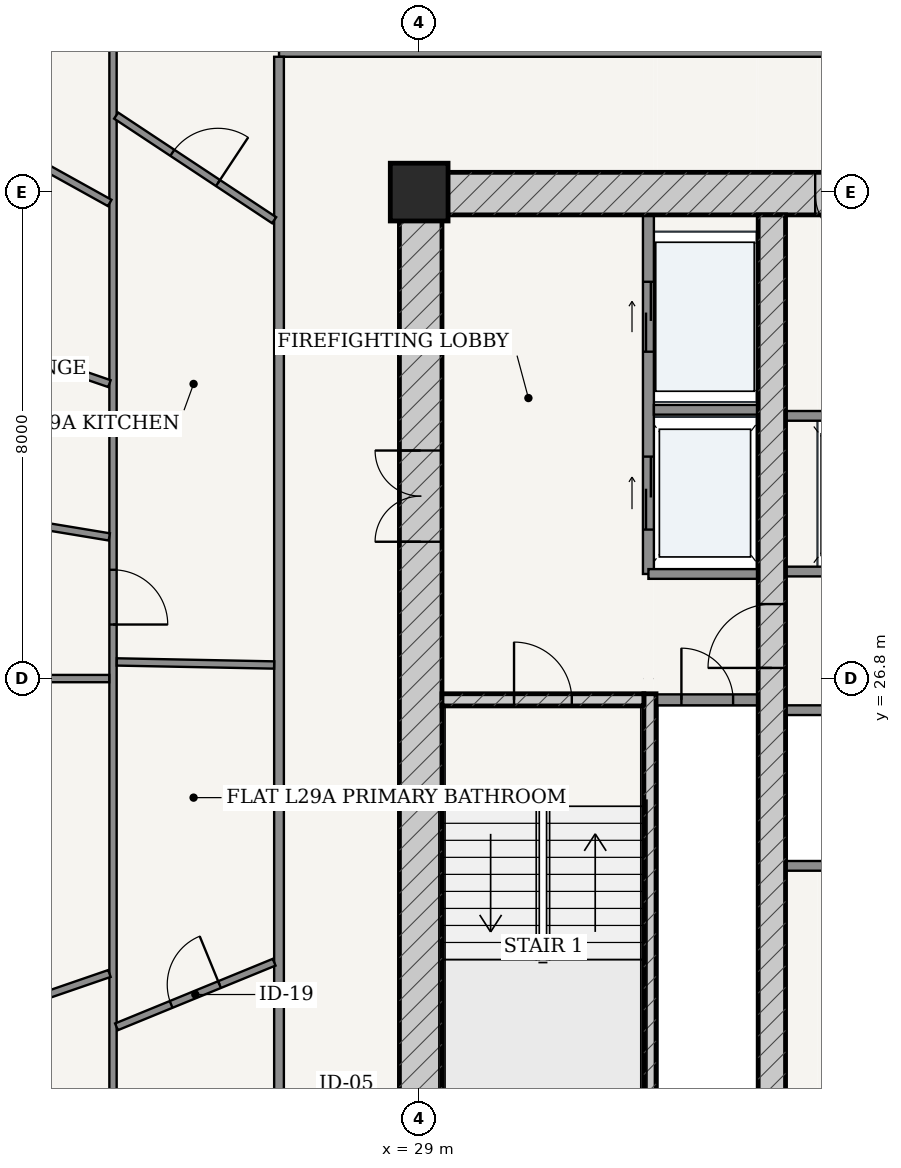
"""IFC4 building model, lengths in metres.
Left out: names, types, materials, properties, quantities, classifications, styles, units other than length and angle.
Written with IfcOpenShell. Run it as: python <this file> out.ifc"""

import sys

from ifc_helpers import new_model, si_unit, direction, frame, frame_2d, origin, origin_2d, place, context, subcontext, project, spatial, rectangle, extrude, source, transform, mapped, element, fill, save


model = new_model("IFC4")
c1 = context("Model", 3, precision=1e-05, world=origin(), true_north=direction((-0.2419218956, 0.970295726276)))
c2 = subcontext(c1, "Body", "Model", "MODEL_VIEW")
j1 = project(units=[si_unit("LENGTHUNIT", "METRE"), si_unit("PLANEANGLEUNIT", "RADIAN")], contexts=[c1])
p1 = place(None, origin())
s1 = spatial("IfcSite", under=j1, at=p1, CompositionType="ELEMENT")
p2 = place(p1, origin())
s2 = spatial("IfcBuilding", under=s1, at=p2, CompositionType="ELEMENT")
p3 = place(p2, frame((0.0, 0.0, 112.2)))
s3 = spatial("IfcBuildingStorey", under=s2, at=p3, CompositionType="ELEMENT", Elevation=112.2)
p4 = place(p3, frame((29.0, 34.8, 0.0), z_axis=(0.0, 0.0, 1.0), x_axis=(1.0, 0.0, 0.0)))
e1 = element("IfcColumn", 1, at=p4, inside=s3, PredefinedType="COLUMN", context=c2, shape_type="SweptSolid", body=[
    extrude(rectangle(XDim=0.95, YDim=0.95, at=origin_2d()), origin(), (0.0, 0.0, 1.0), 3.6),
])
p5 = place(p3, frame((28.675, 34.775, 0.0), z_axis=(0.0, 0.0, 1.0), x_axis=(1.0, 0.0, 0.0)))
e2 = element("IfcWall", 2, at=p5, inside=s3, PredefinedType="SHEAR", context=c2, shape_type="SweptSolid", body=[
    extrude(rectangle(XDim=18.65, YDim=0.7, at=frame_2d((9.325, 0.0))), origin(), (0.0, 0.0, 1.0), 3.325),
])
p6 = place(p5, frame((6.837, 0.0, 0.0)))
e3 = element("IfcOpeningElement", 3, at=p6, cuts=e2, PredefinedType="OPENING", context=c2, shape_type="SweptSolid", body=[
    extrude(rectangle(XDim=0.85, YDim=2.1, at=frame_2d((0.425, 1.05))), frame((0.0, 0.36, 0.0), z_axis=(0.0, -1.0, 0.0), x_axis=(1.0, 0.0, 0.0)), (0.0, 0.0, 1.0), 0.72),
])
p7 = place(p5, frame((8.895, 0.0, 0.0)))
e4 = element("IfcOpeningElement", 4, at=p7, cuts=e2, PredefinedType="OPENING", context=c2, shape_type="SweptSolid", body=[
    extrude(rectangle(XDim=0.86, YDim=2.1, at=frame_2d((0.43, 1.05))), frame((0.0, 0.36, 0.0), z_axis=(0.0, -1.0, 0.0), x_axis=(1.0, 0.0, 0.0)), (0.0, 0.0, 1.0), 0.72),
])
p8 = place(p5, frame((10.962, 0.0, 0.0)))
e5 = element("IfcOpeningElement", 5, at=p8, cuts=e2, PredefinedType="OPENING", context=c2, shape_type="SweptSolid", body=[
    extrude(rectangle(XDim=0.85, YDim=2.1, at=frame_2d((0.425, 1.05))), frame((0.0, 0.36, 0.0), z_axis=(0.0, -1.0, 0.0), x_axis=(1.0, 0.0, 0.0)), (0.0, 0.0, 1.0), 0.72),
])
p9 = place(p3, frame((29.025, 19.175, 0.0), z_axis=(0.0, 0.0, 1.0), x_axis=(0.0, 1.0, 0.0)))
e6 = element("IfcWall", 6, at=p9, inside=s3, PredefinedType="SHEAR", context=c2, shape_type="SweptSolid", body=[
    extrude(rectangle(XDim=15.25, YDim=0.7, at=frame_2d((7.625, 0.0))), origin(), (0.0, 0.0, 1.0), 3.325),
])
p10 = place(p9, frame((9.875, 0.0, 0.0)))
e7 = element("IfcOpeningElement", 7, at=p10, cuts=e6, PredefinedType="OPENING", context=c2, shape_type="SweptSolid", body=[
    extrude(rectangle(XDim=1.5, YDim=2.2, at=frame_2d((0.75, 1.1))), frame((0.0, 0.36, 0.0), z_axis=(0.0, -1.0, 0.0), x_axis=(1.0, 0.0, 0.0)), (0.0, 0.0, 1.0), 0.72),
])
p11 = place(p3, frame((32.795, 19.175, 0.0), z_axis=(0.0, 0.0, 1.0), x_axis=(0.0, 1.0, 0.0)))
e8 = element("IfcWall", 8, at=p11, inside=s3, PredefinedType="SOLIDWALL", context=c2, shape_type="SweptSolid", body=[
    extrude(rectangle(XDim=7.375, YDim=0.2, at=frame_2d((3.688, 0.0))), origin(), (0.0, 0.0, 1.0), 3.325),
])
p12 = place(p3, frame((29.375, 26.45, 0.0), z_axis=(0.0, 0.0, 1.0), x_axis=(1.0, 0.0, 0.0)))
e9 = element("IfcWall", 9, at=p12, inside=s3, PredefinedType="SOLIDWALL", context=c2, shape_type="SweptSolid", body=[
    extrude(rectangle(XDim=3.32, YDim=0.2, at=frame_2d((1.66, 0.0))), origin(), (0.0, 0.0, 1.0), 3.325),
])
p13 = place(p12, frame((1.185, 0.0, 0.0)))
e10 = element("IfcOpeningElement", 10, at=p13, cuts=e9, PredefinedType="OPENING", context=c2, shape_type="SweptSolid", body=[
    extrude(rectangle(XDim=0.95, YDim=2.15, at=frame_2d((0.475, 1.075))), frame((0.0, 0.11, 0.0), z_axis=(0.0, -1.0, 0.0), x_axis=(1.0, 0.0, 0.0)), (0.0, 0.0, 1.0), 0.22),
])
p14 = place(p3, frame((34.8, 19.175, 0.0), z_axis=(0.0, 0.0, 1.0), x_axis=(0.0, 1.0, 0.0)))
e11 = element("IfcWall", 11, at=p14, inside=s3, PredefinedType="SHEAR", context=c2, shape_type="SweptSolid", body=[
    extrude(rectangle(XDim=15.25, YDim=0.45, at=frame_2d((7.625, 0.0))), origin(), (0.0, 0.0, 1.0), 3.325),
])
p15 = place(p14, frame((7.8, 0.0, 0.0)))
e12 = element("IfcOpeningElement", 12, at=p15, cuts=e11, PredefinedType="OPENING", context=c2, shape_type="SweptSolid", body=[
    extrude(rectangle(XDim=1.05, YDim=2.15, at=frame_2d((0.525, 1.075))), frame((0.0, 0.235, 0.0), z_axis=(0.0, -1.0, 0.0), x_axis=(1.0, 0.0, 0.0)), (0.0, 0.0, 1.0), 0.47),
])
p16 = place(p3, frame((32.9, 26.45, 0.0), z_axis=(0.0, 0.0, 1.0), x_axis=(1.0, 0.0, 0.0)))
e13 = element("IfcWall", 13, at=p16, inside=s3, PredefinedType="PARTITIONING", context=c2, shape_type="SweptSolid", body=[
    extrude(rectangle(XDim=1.675, YDim=0.18, at=frame_2d((0.837, 0.0))), origin(), (0.0, 0.0, 1.0), 3.325),
])
p17 = place(p16, frame((0.413, 0.0, 0.0)))
e14 = element("IfcOpeningElement", 14, at=p17, cuts=e13, PredefinedType="OPENING", context=c2, shape_type="SweptSolid", body=[
    extrude(rectangle(XDim=0.85, YDim=2.1, at=frame_2d((0.425, 1.05))), frame((0.0, 0.1, 0.0), z_axis=(0.0, -1.0, 0.0), x_axis=(1.0, 0.0, 0.0)), (0.0, 0.0, 1.0), 0.2),
])
p18 = place(p3, frame((32.77, 28.52, 0.0), z_axis=(0.0, 0.0, 1.0), x_axis=(0.0, 1.0, 0.0)))
e15 = element("IfcWall", 15, at=p18, inside=s3, PredefinedType="PARTITIONING", context=c2, shape_type="SweptSolid", body=[
    extrude(rectangle(XDim=5.905, YDim=0.18, at=frame_2d((2.953, 0.0))), origin(), (0.0, 0.0, 1.0), 3.325),
])
p19 = place(p18, frame((3.655, 0.0, 0.0)))
e16 = element("IfcOpeningElement", 16, at=p19, cuts=e15, PredefinedType="OPENING", context=c2, shape_type="SweptSolid", body=[
    extrude(rectangle(XDim=1.15, YDim=2.2, at=frame_2d((0.575, 1.1))), frame((0.0, 0.1, 0.0), z_axis=(0.0, -1.0, 0.0), x_axis=(1.0, 0.0, 0.0)), (0.0, 0.0, 1.0), 0.2),
])
p20 = place(p18, frame((0.73, 0.0, 0.0)))
e17 = element("IfcOpeningElement", 17, at=p20, cuts=e15, PredefinedType="OPENING", context=c2, shape_type="SweptSolid", body=[
    extrude(rectangle(XDim=1.2, YDim=2.25, at=frame_2d((0.6, 1.125))), frame((0.0, 0.1, 0.0), z_axis=(0.0, -1.0, 0.0), x_axis=(1.0, 0.0, 0.0)), (0.0, 0.0, 1.0), 0.2),
])
p21 = place(p3, frame((32.86, 31.22, 0.0), z_axis=(0.0, 0.0, 1.0), x_axis=(1.0, 0.0, 0.0)))
e18 = element("IfcWall", 18, at=p21, inside=s3, PredefinedType="PARTITIONING", context=c2, shape_type="SweptSolid", body=[
    extrude(rectangle(XDim=1.715, YDim=0.16, at=frame_2d((0.857, 0.0))), origin(), (0.0, 0.0, 1.0), 3.325),
])
p22 = place(p3, frame((32.77, 28.52, 0.0), z_axis=(0.0, 0.0, 1.0), x_axis=(1.0, 0.0, 0.0)))
e19 = element("IfcWall", 19, at=p22, inside=s3, PredefinedType="PARTITIONING", context=c2, shape_type="SweptSolid", body=[
    extrude(rectangle(XDim=1.805, YDim=0.16, at=frame_2d((0.902, 0.0))), origin(), (0.0, 0.0, 1.0), 3.325),
])
p23 = place(p3, frame((35.025, 28.56, 0.0), z_axis=(0.0, 0.0, 1.0), x_axis=(1.0, 0.0, 0.0)))
e20 = element("IfcWall", 20, at=p23, inside=s3, PredefinedType="PARTITIONING", context=c2, shape_type="SweptSolid", body=[
    extrude(rectangle(XDim=5.95, YDim=0.16, at=frame_2d((2.975, 0.0))), origin(), (0.0, 0.0, 1.0), 3.325),
])
p24 = place(p23, frame((0.76, 0.0, 0.0)))
e21 = element("IfcOpeningElement", 21, at=p24, cuts=e20, PredefinedType="OPENING", context=c2, shape_type="SweptSolid", body=[
    extrude(rectangle(XDim=1.1, YDim=2.2, at=frame_2d((0.55, 1.1))), frame((0.0, 0.09, 0.0), z_axis=(0.0, -1.0, 0.0), x_axis=(1.0, 0.0, 0.0)), (0.0, 0.0, 1.0), 0.18),
])
p25 = place(p23, frame((2.425, 0.0, 0.0)))
e22 = element("IfcOpeningElement", 22, at=p25, cuts=e20, PredefinedType="OPENING", context=c2, shape_type="SweptSolid", body=[
    extrude(rectangle(XDim=1.1, YDim=2.2, at=frame_2d((0.55, 1.1))), frame((0.0, 0.09, 0.0), z_axis=(0.0, -1.0, 0.0), x_axis=(1.0, 0.0, 0.0)), (0.0, 0.0, 1.0), 0.18),
])
p26 = place(p23, frame((4.09, 0.0, 0.0)))
e23 = element("IfcOpeningElement", 23, at=p26, cuts=e20, PredefinedType="OPENING", context=c2, shape_type="SweptSolid", body=[
    extrude(rectangle(XDim=1.1, YDim=2.2, at=frame_2d((0.55, 1.1))), frame((0.0, 0.09, 0.0), z_axis=(0.0, -1.0, 0.0), x_axis=(1.0, 0.0, 0.0)), (0.0, 0.0, 1.0), 0.18),
])
for number, where, z_axis, x_axis in (
    (24, (35.025, 31.12, 0.0), (0.0, 0.0, 1.0), (1.0, 0.0, 0.0)),
    (25, (35.025, 26.28, 0.0), (0.0, 0.0, 1.0), (1.0, 0.0, 0.0)),
    (26, (35.025, 23.72, 0.0), (0.0, 0.0, 1.0), (1.0, 0.0, 0.0)),
):
    element("IfcWall", number, at=place(p3, frame(where, z_axis=z_axis, x_axis=x_axis)), inside=s3, PredefinedType="PARTITIONING", context=c2, shape_type="SweptSolid", body=[
        extrude(rectangle(XDim=5.95, YDim=0.16, at=frame_2d((2.975, 0.0))), origin(), (0.0, 0.0, 1.0), 3.325),
    ])
p27 = place(p3, frame((26.695, 37.105, 0.0), z_axis=(0.0, 0.0, 1.0), x_axis=(1.0, 0.0, 0.0)))
e27 = element("IfcWall", 27, at=p27, inside=s3, PredefinedType="PARTITIONING", context=c2, shape_type="SweptSolid", body=[
    extrude(rectangle(XDim=22.61, YDim=0.16, at=frame_2d((11.305, 0.0))), origin(), (0.0, 0.0, 1.0), 2.767),
])
p28 = place(p3, frame((26.695, 16.575, 0.0), z_axis=(0.0, 0.0, 1.0), x_axis=(0.0, 1.0, 0.0)))
e28 = element("IfcWall", 28, at=p28, inside=s3, PredefinedType="PARTITIONING", context=c2, shape_type="SweptSolid", body=[
    extrude(rectangle(XDim=20.45, YDim=0.16, at=frame_2d((10.225, 0.0))), origin(), (0.0, 0.0, 1.0), 2.767),
])
p29 = place(p28, frame((2.424, 0.0, 0.0)))
e29 = element("IfcOpeningElement", 29, at=p29, cuts=e28, PredefinedType="OPENING", context=c2, shape_type="SweptSolid", body=[
    extrude(rectangle(XDim=0.98, YDim=2.2, at=frame_2d((0.49, 1.1))), frame((0.0, 0.09, 0.0), z_axis=(0.0, -1.0, 0.0), x_axis=(1.0, 0.0, 0.0)), (0.0, 0.0, 1.0), 0.18),
])
p30 = place(p3, frame((23.965, 13.765, 0.0), z_axis=(0.0, 0.0, 1.0), x_axis=(0.0, 1.0, 0.0)))
e30 = element("IfcWall", 30, at=p30, inside=s3, PredefinedType="PARTITIONING", context=c2, shape_type="SweptSolid", body=[
    extrude(rectangle(XDim=26.07, YDim=0.12, at=frame_2d((13.035, 0.0))), origin(), (0.0, 0.0, 1.0), 2.767),
])
p31 = place(p30, frame((3.362, 0.0, 0.0)))
e31 = element("IfcOpeningElement", 31, at=p31, cuts=e30, PredefinedType="OPENING", context=c2, shape_type="SweptSolid", body=[
    extrude(rectangle(XDim=0.9, YDim=2.15, at=frame_2d((0.45, 1.075))), frame((0.0, 0.07, 0.0), z_axis=(0.0, -1.0, 0.0), x_axis=(1.0, 0.0, 0.0)), (0.0, 0.0, 1.0), 0.14),
])
p32 = place(p30, frame((13.924, 0.0, 0.0)))
e32 = element("IfcOpeningElement", 32, at=p32, cuts=e30, PredefinedType="OPENING", context=c2, shape_type="SweptSolid", body=[
    extrude(rectangle(XDim=0.9, YDim=2.15, at=frame_2d((0.45, 1.075))), frame((0.0, 0.07, 0.0), z_axis=(0.0, -1.0, 0.0), x_axis=(1.0, 0.0, 0.0)), (0.0, 0.0, 1.0), 0.14),
])
p33 = place(p3, frame((23.911, 34.622, 0.0), z_axis=(0.0, 0.0, 1.0), x_axis=(-0.874324904351, 0.485341077626, 0.0)))
e33 = element("IfcWall", 33, at=p33, inside=s3, PredefinedType="PARTITIONING", context=c2, shape_type="SweptSolid", body=[
    extrude(rectangle(XDim=9.066, YDim=0.12, at=frame_2d((4.533, 0.0))), origin(), (0.0, 0.0, 1.0), 2.767),
])
p34 = place(p3, frame((23.906, 31.65, 0.0), z_axis=(0.0, 0.0, 1.0), x_axis=(-0.945573120726, 0.32540970078, 0.0)))
e34 = element("IfcWall", 34, at=p34, inside=s3, PredefinedType="PARTITIONING", context=c2, shape_type="SweptSolid", body=[
    extrude(rectangle(XDim=11.022, YDim=0.12, at=frame_2d((5.511, 0.0))), origin(), (0.0, 0.0, 1.0), 2.767),
])
p35 = place(p34, frame((5.061, 0.0, 0.0)))
e35 = element("IfcOpeningElement", 35, at=p35, cuts=e34, PredefinedType="OPENING", context=c2, shape_type="SweptSolid", body=[
    extrude(rectangle(XDim=0.9, YDim=2.15, at=frame_2d((0.45, 1.075))), frame((0.0, 0.07, 0.0), z_axis=(0.0, -1.0, 0.0), x_axis=(1.0, 0.0, 0.0)), (0.0, 0.0, 1.0), 0.14),
])
p36 = place(p3, frame((23.904, 29.13, 0.0), z_axis=(0.0, 0.0, 1.0), x_axis=(-0.986618264768, 0.163047231274, 0.0)))
e36 = element("IfcWall", 36, at=p36, inside=s3, PredefinedType="PARTITIONING", context=c2, shape_type="SweptSolid", body=[
    extrude(rectangle(XDim=12.039, YDim=0.12, at=frame_2d((6.02, 0.0))), origin(), (0.0, 0.0, 1.0), 2.767),
])
p37 = place(p36, frame((4.496, 0.0, 0.0)))
e37 = element("IfcOpeningElement", 37, at=p37, cuts=e36, PredefinedType="OPENING", context=c2, shape_type="SweptSolid", body=[
    extrude(rectangle(XDim=0.9, YDim=2.15, at=frame_2d((0.45, 1.075))), frame((0.0, 0.07, 0.0), z_axis=(0.0, -1.0, 0.0), x_axis=(1.0, 0.0, 0.0)), (0.0, 0.0, 1.0), 0.14),
])
p38 = place(p3, frame((23.903, 26.8, 0.0), z_axis=(0.0, 0.0, 1.0), x_axis=(-1.0, 0.0, 0.0)))
e38 = element("IfcWall", 38, at=p38, inside=s3, PredefinedType="PARTITIONING", context=c2, shape_type="SweptSolid", body=[
    extrude(rectangle(XDim=12.443, YDim=0.12, at=frame_2d((6.222, 0.0))), origin(), (0.0, 0.0, 1.0), 2.767),
])
p39 = place(p38, frame((5.771, 0.0, 0.0)))
e39 = element("IfcOpeningElement", 39, at=p39, cuts=e38, PredefinedType="OPENING", context=c2, shape_type="SweptSolid", body=[
    extrude(rectangle(XDim=0.9, YDim=2.15, at=frame_2d((0.45, 1.075))), frame((0.0, 0.07, 0.0), z_axis=(0.0, -1.0, 0.0), x_axis=(1.0, 0.0, 0.0)), (0.0, 0.0, 1.0), 0.14),
])
p40 = place(p3, frame((23.906, 21.95, 0.0), z_axis=(0.0, 0.0, 1.0), x_axis=(-0.945573120726, -0.32540970078, 0.0)))
e40 = element("IfcWall", 40, at=p40, inside=s3, PredefinedType="PARTITIONING", context=c2, shape_type="SweptSolid", body=[
    extrude(rectangle(XDim=11.022, YDim=0.12, at=frame_2d((5.511, 0.0))), origin(), (0.0, 0.0, 1.0), 2.767),
])
p41 = place(p40, frame((5.061, 0.0, 0.0)))
e41 = element("IfcOpeningElement", 41, at=p41, cuts=e40, PredefinedType="OPENING", context=c2, shape_type="SweptSolid", body=[
    extrude(rectangle(XDim=0.9, YDim=2.15, at=frame_2d((0.45, 1.075))), frame((0.0, 0.07, 0.0), z_axis=(0.0, -1.0, 0.0), x_axis=(1.0, 0.0, 0.0)), (0.0, 0.0, 1.0), 0.14),
])
p42 = place(p3, frame((26.615, 34.337, 0.0), z_axis=(0.0, 0.0, 1.0), x_axis=(-0.833829855758, 0.552021531868, 0.0)))
e42 = element("IfcWall", 42, at=p42, inside=s3, PredefinedType="PARTITIONING", context=c2, shape_type="SweptSolid", body=[
    extrude(rectangle(XDim=3.116, YDim=0.12, at=frame_2d((1.558, 0.0))), origin(), (0.0, 0.0, 1.0), 3.325),
])
p43 = place(p42, frame((1.108, 0.0, 0.0)))
e43 = element("IfcOpeningElement", 43, at=p43, cuts=e42, PredefinedType="OPENING", context=c2, shape_type="SweptSolid", body=[
    extrude(rectangle(XDim=0.9, YDim=2.15, at=frame_2d((0.45, 1.075))), frame((0.0, 0.07, 0.0), z_axis=(0.0, -1.0, 0.0), x_axis=(1.0, 0.0, 0.0)), (0.0, 0.0, 1.0), 0.14),
])
p44 = place(p3, frame((26.615, 27.023, 0.0), z_axis=(0.0, 0.0, 1.0), x_axis=(-0.999809377232, 0.019524579348, 0.0)))
e44 = element("IfcWall", 44, at=p44, inside=s3, PredefinedType="PARTITIONING", context=c2, shape_type="SweptSolid", body=[
    extrude(rectangle(XDim=2.588, YDim=0.12, at=frame_2d((1.294, 0.0))), origin(), (0.0, 0.0, 1.0), 3.325),
])
p45 = place(p3, frame((26.615, 22.135, 0.0), z_axis=(0.0, 0.0, 1.0), x_axis=(-0.925337216259, -0.379145138708, 0.0)))
e45 = element("IfcWall", 45, at=p45, inside=s3, PredefinedType="PARTITIONING", context=c2, shape_type="SweptSolid", body=[
    extrude(rectangle(XDim=2.802, YDim=0.12, at=frame_2d((1.401, 0.0))), origin(), (0.0, 0.0, 1.0), 3.325),
])
p46 = place(p45, frame((0.971, 0.0, 0.0)))
e46 = element("IfcOpeningElement", 46, at=p46, cuts=e45, PredefinedType="OPENING", context=c2, shape_type="SweptSolid", body=[
    extrude(rectangle(XDim=0.86, YDim=2.15, at=frame_2d((0.43, 1.075))), frame((0.0, 0.07, 0.0), z_axis=(0.0, -1.0, 0.0), x_axis=(1.0, 0.0, 0.0)), (0.0, 0.0, 1.0), 0.14),
])
m1 = source(origin(), c2, "Body", "SweptSolid", [
    extrude(rectangle(XDim=1.5, YDim=2.2, at=frame_2d((0.75, 1.1))), frame((0.0, 0.025, 0.0), z_axis=(0.0, -1.0, 0.0), x_axis=(1.0, 0.0, 0.0)), (0.0, 0.0, 1.0), 0.05),
])
p47 = place(p10, origin())
e47 = element("IfcDoor", 47, at=p47, inside=s3, OperationType="DOUBLE_DOOR_SINGLE_SWING", PredefinedType="DOOR", context=c2, shape_type="MappedRepresentation", body=[
    mapped(m1, transform((0.0, 0.0, 0.0), scale=1.0)),
])
fill(e7, e47)
m2 = source(origin(), c2, "Body", "SweptSolid", [
    extrude(rectangle(XDim=1.05, YDim=2.15, at=frame_2d((0.525, 1.075))), frame((0.0, 0.025, 0.0), z_axis=(0.0, -1.0, 0.0), x_axis=(1.0, 0.0, 0.0)), (0.0, 0.0, 1.0), 0.05),
])
p48 = place(p15, origin())
e48 = element("IfcDoor", 48, at=p48, inside=s3, OperationType="SINGLE_SWING_LEFT", PredefinedType="DOOR", context=c2, shape_type="MappedRepresentation", body=[
    mapped(m2, transform((0.0, 0.0, 0.0), scale=1.0)),
])
fill(e12, e48)
m3 = source(origin(), c2, "Body", "SweptSolid", [
    extrude(rectangle(XDim=0.95, YDim=2.15, at=frame_2d((0.475, 1.075))), frame((0.0, 0.025, 0.0), z_axis=(0.0, -1.0, 0.0), x_axis=(1.0, 0.0, 0.0)), (0.0, 0.0, 1.0), 0.05),
])
p49 = place(p13, origin())
e49 = element("IfcDoor", 49, at=p49, inside=s3, OperationType="SINGLE_SWING_LEFT", PredefinedType="DOOR", context=c2, shape_type="MappedRepresentation", body=[
    mapped(m3, transform((0.0, 0.0, 0.0), scale=1.0)),
])
fill(e10, e49)
m4 = source(origin(), c2, "Body", "SweptSolid", [
    extrude(rectangle(XDim=0.85, YDim=2.1, at=frame_2d((0.425, 1.05))), frame((0.0, 0.025, 0.0), z_axis=(0.0, -1.0, 0.0), x_axis=(1.0, 0.0, 0.0)), (0.0, 0.0, 1.0), 0.05),
])
p50 = place(p17, origin())
e50 = element("IfcDoor", 50, at=p50, inside=s3, OperationType="SINGLE_SWING_LEFT", PredefinedType="DOOR", context=c2, shape_type="MappedRepresentation", body=[
    mapped(m4, transform((0.0, 0.0, 0.0), scale=1.0)),
])
fill(e14, e50)
p51 = place(p6, frame((0.85, 0.0, 0.0), z_axis=(0.0, 0.0, 1.0), x_axis=(-1.0, 0.0, 0.0)))
e51 = element("IfcDoor", 51, at=p51, inside=s3, OperationType="SINGLE_SWING_LEFT", PredefinedType="DOOR", context=c2, shape_type="MappedRepresentation", body=[
    mapped(m4, transform((0.0, 0.0, 0.0), scale=1.0)),
])
fill(e3, e51)
m5 = source(origin(), c2, "Body", "SweptSolid", [
    extrude(rectangle(XDim=1.15, YDim=2.2, at=frame_2d((0.575, 1.1))), frame((0.0, 0.025, 0.0), z_axis=(0.0, -1.0, 0.0), x_axis=(1.0, 0.0, 0.0)), (0.0, 0.0, 1.0), 0.05),
])
p52 = place(p19, origin())
e52 = element("IfcDoor", 52, at=p52, inside=s3, OperationType="DOUBLE_DOOR_SLIDING", PredefinedType="DOOR", context=c2, shape_type="MappedRepresentation", body=[
    mapped(m5, transform((0.0, 0.0, 0.0), scale=1.0)),
])
fill(e16, e52)
m6 = source(origin(), c2, "Body", "SweptSolid", [
    extrude(rectangle(XDim=1.2, YDim=2.25, at=frame_2d((0.6, 1.125))), frame((0.0, 0.025, 0.0), z_axis=(0.0, -1.0, 0.0), x_axis=(1.0, 0.0, 0.0)), (0.0, 0.0, 1.0), 0.05),
])
p53 = place(p20, origin())
e53 = element("IfcDoor", 53, at=p53, inside=s3, OperationType="DOUBLE_DOOR_SLIDING", PredefinedType="DOOR", context=c2, shape_type="MappedRepresentation", body=[
    mapped(m6, transform((0.0, 0.0, 0.0), scale=1.0)),
])
fill(e17, e53)
m7 = source(origin(), c2, "Body", "SweptSolid", [
    extrude(rectangle(XDim=0.86, YDim=2.15, at=frame_2d((0.43, 1.075))), frame((0.0, 0.025, 0.0), z_axis=(0.0, -1.0, 0.0), x_axis=(1.0, 0.0, 0.0)), (0.0, 0.0, 1.0), 0.05),
])
p54 = place(p46, frame((0.86, 0.0, 0.0), z_axis=(0.0, 0.0, 1.0), x_axis=(-1.0, 0.0, 0.0)))
e54 = element("IfcDoor", 54, at=p54, inside=s3, OperationType="SINGLE_SWING_RIGHT", PredefinedType="DOOR", context=c2, shape_type="MappedRepresentation", body=[
    mapped(m7, transform((0.0, 0.0, 0.0), scale=1.0)),
])
fill(e46, e54)
m8 = source(origin(), c2, "Body", "SweptSolid", [
    extrude(rectangle(XDim=0.9, YDim=2.15, at=frame_2d((0.45, 1.075))), frame((0.0, 0.025, 0.0), z_axis=(0.0, -1.0, 0.0), x_axis=(1.0, 0.0, 0.0)), (0.0, 0.0, 1.0), 0.05),
])
p55 = place(p32, frame((0.9, 0.0, 0.0), z_axis=(0.0, 0.0, 1.0), x_axis=(-1.0, 0.0, 0.0)))
e55 = element("IfcDoor", 55, at=p55, inside=s3, OperationType="SINGLE_SWING_RIGHT", PredefinedType="DOOR", context=c2, shape_type="MappedRepresentation", body=[
    mapped(m8, transform((0.0, 0.0, 0.0), scale=1.0)),
])
fill(e32, e55)
p56 = place(p43, frame((0.9, 0.0, 0.0), z_axis=(0.0, 0.0, 1.0), x_axis=(-1.0, 0.0, 0.0)))
e56 = element("IfcDoor", 56, at=p56, inside=s3, OperationType="SINGLE_SWING_RIGHT", PredefinedType="DOOR", context=c2, shape_type="MappedRepresentation", body=[
    mapped(m8, transform((0.0, 0.0, 0.0), scale=1.0)),
])
fill(e43, e56)
save(model, sys.argv[1])
